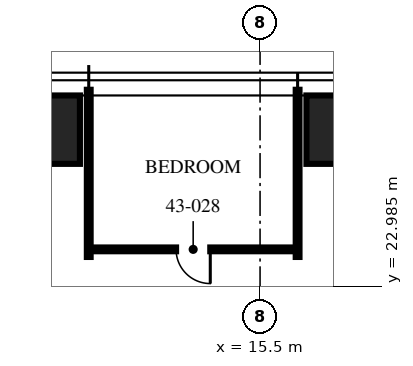
"""IFC4 building model, lengths in metres.
Left out: names, types, materials, properties, quantities, classifications, styles, units other than length and angle.
Written with IfcOpenShell. Run it as: python <this file> out.ifc"""

import sys

from ifc_helpers import new_model, si_unit, direction, frame, frame_2d, origin, origin_2d, place, context, subcontext, project, spatial, rectangle, hollow_rectangle, extrude, element, fill, save


model = new_model("IFC4")
c1 = context("Model", 3, precision=1e-05, world=origin(), true_north=direction((0.0, 1.0)))
c2 = subcontext(c1, "Body", "Model", "MODEL_VIEW")
j1 = project(units=[si_unit("LENGTHUNIT", "METRE"), si_unit("PLANEANGLEUNIT", "RADIAN")], contexts=[c1])
p1 = place(None, origin())
s1 = spatial("IfcSite", under=j1, at=p1, CompositionType="ELEMENT")
p2 = place(p1, origin())
s2 = spatial("IfcBuilding", under=s1, at=p2, CompositionType="ELEMENT")
p3 = place(p2, frame((0.0, 0.0, 171.0)))
s3 = spatial("IfcBuildingStorey", under=s2, at=p3, CompositionType="ELEMENT", Elevation=171.0)
for number, where, z_axis, x_axis in (
    (1, (9.16, 27.1, 0.0), (0.0, 0.0, 1.0), (1.0, 0.0, 0.0)),
    (2, (18.32, 27.1, 0.0), (0.0, 0.0, 1.0), (1.0, 0.0, 0.0)),
):
    element("IfcColumn", number, at=place(p3, frame(where, z_axis=z_axis, x_axis=x_axis)), inside=s3, PredefinedType="COLUMN", context=c2, shape_type="SweptSolid", body=[
        extrude(hollow_rectangle(XDim=3.2, YDim=1.8, WallThickness=0.2, at=origin_2d()), origin(), (0.0, 0.0, 1.0), 3.75),
    ])
for number, where, z_axis, x_axis in (
    (3, (16.488, 23.75, 0.0), (0.0, 0.0, 1.0), (0.0, 1.0, 0.0)),
    (4, (10.992, 23.75, 0.0), (0.0, 0.0, 1.0), (0.0, 1.0, 0.0)),
):
    element("IfcWall", number, at=place(p3, frame(where, z_axis=z_axis, x_axis=x_axis)), inside=s3, PredefinedType="PARTITIONING", context=c2, shape_type="SweptSolid", body=[
        extrude(rectangle(XDim=4.4, YDim=0.1, at=frame_2d((2.2, 0.0))), origin(), (0.0, 0.0, 1.0), 2.81),
    ])
p4 = place(p3, frame((16.488, 23.95, 0.0), z_axis=(0.0, 0.0, 1.0), x_axis=(-1.0, 0.0, 0.0)))
e5 = element("IfcWall", 5, at=p4, inside=s3, PredefinedType="PARTITIONING", context=c2, shape_type="SweptSolid", body=[
    extrude(rectangle(XDim=5.496, YDim=0.1, at=frame_2d((2.748, 0.0))), origin(), (0.0, 0.0, 1.0), 2.81),
])
p5 = place(p4, frame((2.298, 0.0, 0.0)))
e6 = element("IfcOpeningElement", 6, at=p5, cuts=e5, PredefinedType="OPENING", context=c2, shape_type="SweptSolid", body=[
    extrude(rectangle(XDim=0.9, YDim=2.1, at=frame_2d((0.45, 1.05))), frame((0.0, 0.06, 0.0), z_axis=(0.0, -1.0, 0.0), x_axis=(1.0, 0.0, 0.0)), (0.0, 0.0, 1.0), 0.12),
])
p6 = place(p5, origin())
e7 = element("IfcDoor", 7, at=p6, inside=s3, OperationType="SINGLE_SWING_LEFT", PredefinedType="DOOR", context=c2, shape_type="SweptSolid", body=[
    extrude(rectangle(XDim=0.9, YDim=2.1, at=frame_2d((0.45, 1.05))), frame((0.0, 0.025, 0.0), z_axis=(0.0, -1.0, 0.0), x_axis=(1.0, 0.0, 0.0)), (0.0, 0.0, 1.0), 0.05),
])
fill(e6, e7)
save(model, sys.argv[1])
